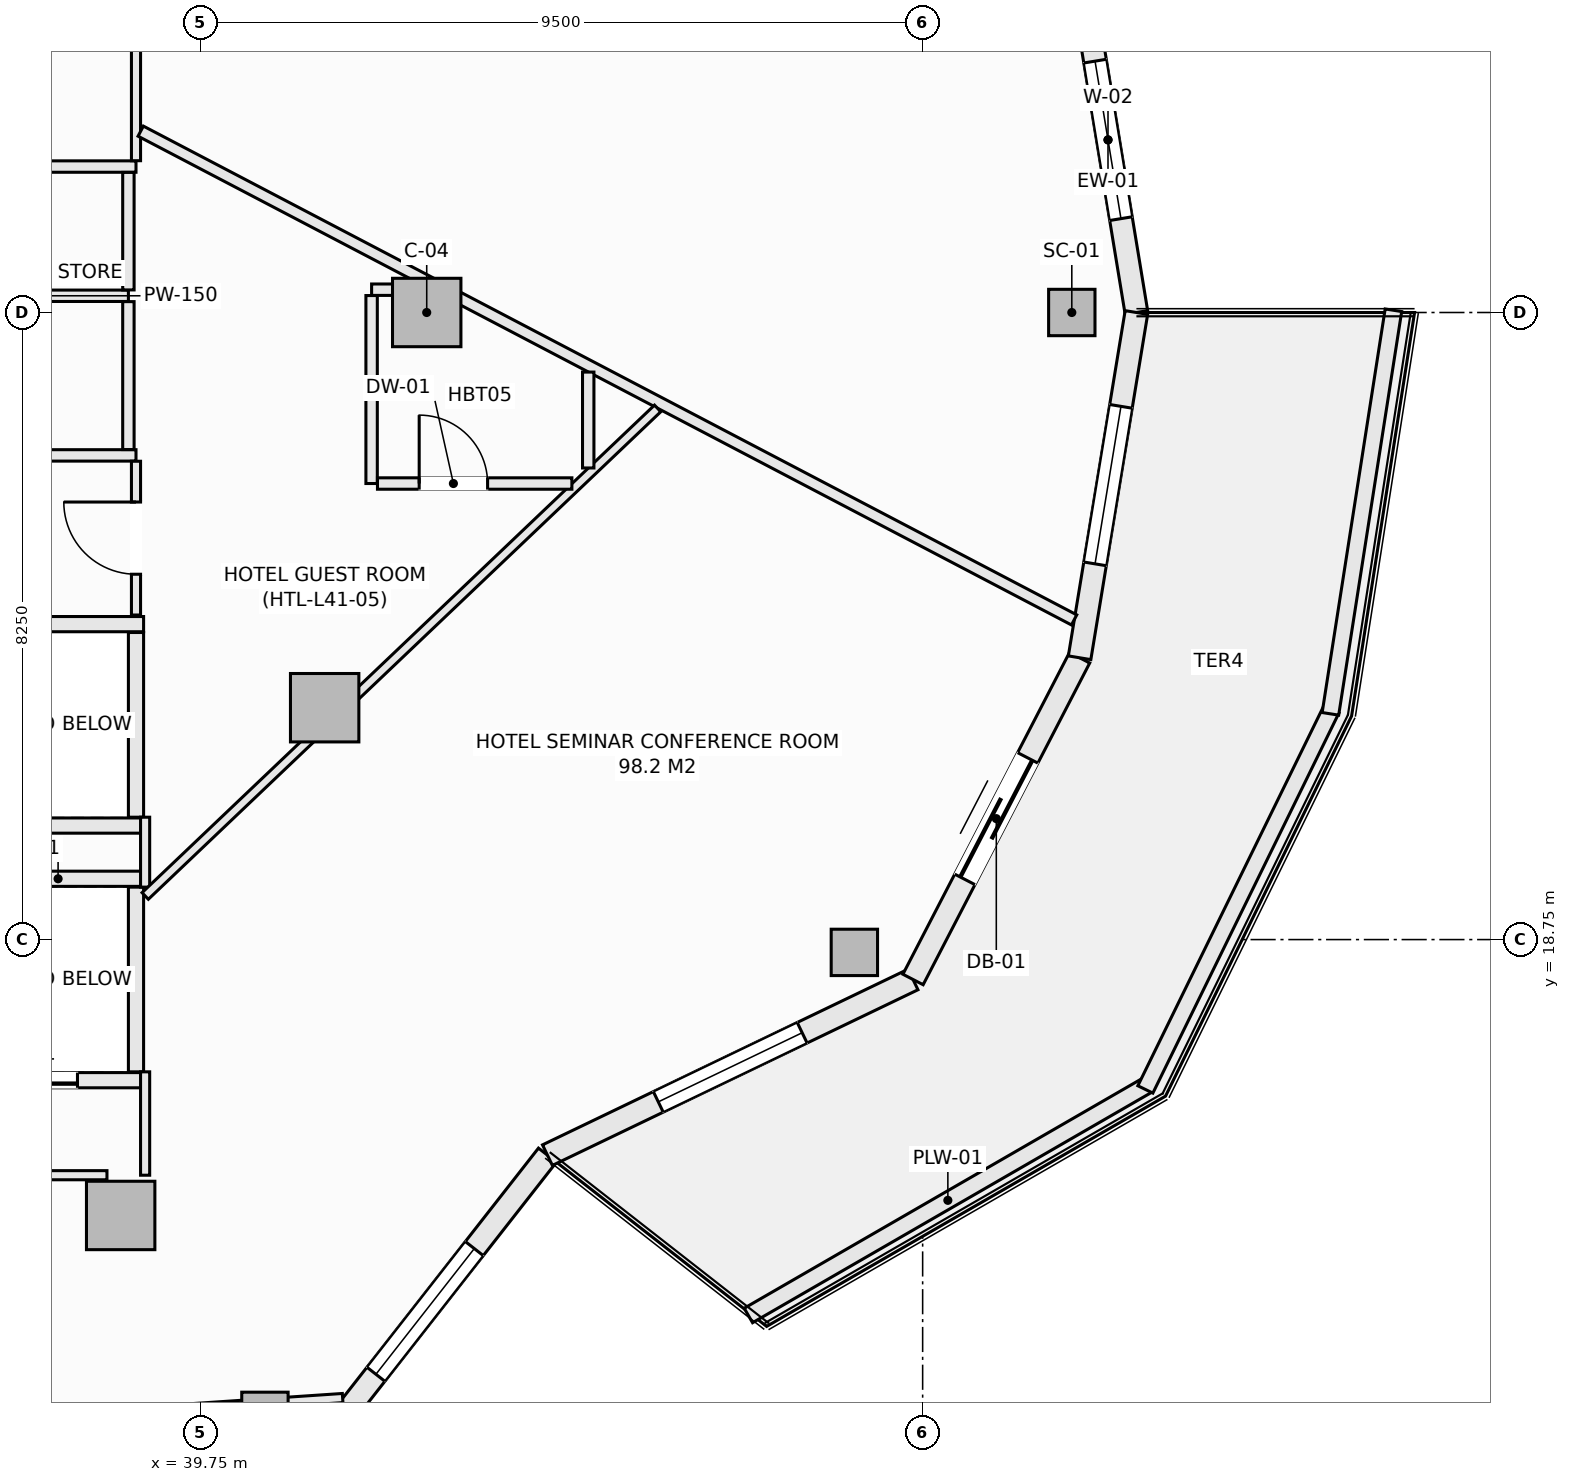
"""IFC4 building model, lengths in metres.
Left out: names, types, materials, properties, quantities, classifications, styles, units other than length and angle.
Written with IfcOpenShell. Run it as: python <this file> out.ifc"""

import sys

from ifc_helpers import new_model, si_unit, direction, frame, frame_2d, origin, origin_2d, place, context, subcontext, project, spatial, rectangle, hollow_rectangle, extrude, element, fill, save


model = new_model("IFC4")
c1 = context("Model", 3, precision=1e-05, world=origin(), true_north=direction((0.0, 1.0)))
c2 = subcontext(c1, "Body", "Model", "MODEL_VIEW")
j1 = project(units=[si_unit("LENGTHUNIT", "METRE"), si_unit("PLANEANGLEUNIT", "RADIAN")], contexts=[c1])
p1 = place(None, origin())
s1 = spatial("IfcSite", under=j1, at=p1, CompositionType="ELEMENT")
p2 = place(p1, origin())
s2 = spatial("IfcBuilding", under=s1, at=p2, CompositionType="ELEMENT")
p3 = place(p2, frame((0.0, 0.0, 159.7)))
s3 = spatial("IfcBuildingStorey", under=s2, at=p3, CompositionType="ELEMENT", Elevation=159.7)
for number, where, z_axis, x_axis in (
    (1, (51.212, 27.0, -0.27), (0.0, 0.0, 1.0), (1.0, 0.0, 0.0)),
    (2, (40.596, 12.49, -0.27), (0.0, 0.0, 1.0), (1.0, 0.0, 0.0)),
    (3, (48.352, 18.581, -0.27), (0.0, 0.0, 1.0), (1.0, 0.0, 0.0)),
):
    element("IfcColumn", number, at=place(p3, frame(where, z_axis=z_axis, x_axis=x_axis)), inside=s3, PredefinedType="COLUMN", context=c2, shape_type="SweptSolid", body=[
        extrude(hollow_rectangle(XDim=0.61, YDim=0.61, WallThickness=0.025, at=origin_2d()), origin(), (0.0, 0.0, 1.0), 3.4),
    ])
for number, where, z_axis, x_axis in (
    (4, (42.725, 27.0, -0.27), (0.0, 0.0, 1.0), (1.0, 0.0, 0.0)),
    (5, (38.698, 15.121, -0.27), (0.0, 0.0, 1.0), (1.0, 0.0, 0.0)),
    (6, (41.382, 21.801, -0.27), (0.0, 0.0, 1.0), (1.0, 0.0, 0.0)),
):
    element("IfcColumn", number, at=place(p3, frame(where, z_axis=z_axis, x_axis=x_axis)), inside=s3, PredefinedType="COLUMN", context=c2, shape_type="SweptSolid", body=[
        extrude(rectangle(XDim=0.9, YDim=0.9, at=origin_2d()), origin(), (0.0, 0.0, 1.0), 3.4),
    ])
p4 = place(p3, frame((51.315, 31.542, 0.0), z_axis=(0.0, 0.0, 1.0), x_axis=(0.162394765401, -0.986725868806, 0.0)))
e7 = element("IfcWall", 7, at=p4, inside=s3, PredefinedType="SOLIDWALL", context=c2, shape_type="SweptSolid", body=[
    extrude(rectangle(XDim=4.603, YDim=0.3, at=frame_2d((2.302, 0.0))), origin(), (0.0, 0.0, 1.0), 2.653),
])
p5 = place(p4, frame((1.252, 0.0, 0.74)))
e8 = element("IfcOpeningElement", 8, at=p5, cuts=e7, PredefinedType="OPENING", context=c2, shape_type="SweptSolid", body=[
    extrude(rectangle(XDim=2.1, YDim=1.7, at=frame_2d((1.05, 0.85))), frame((0.0, 0.16, 0.0), z_axis=(0.0, -1.0, 0.0), x_axis=(1.0, 0.0, 0.0)), (0.0, 0.0, 1.0), 0.32),
])
p6 = place(p3, frame((41.094, 11.801, 0.0), z_axis=(0.0, 0.0, 1.0), x_axis=(0.616429245738, 0.787410302828, 0.0)))
e9 = element("IfcWall", 9, at=p6, inside=s3, PredefinedType="SOLIDWALL", context=c2, shape_type="SweptSolid", body=[
    extrude(rectangle(XDim=5.223, YDim=0.3, at=frame_2d((2.612, 0.0))), origin(), (0.0, 0.0, 1.0), 2.653),
])
p7 = place(p6, frame((1.562, 0.0, 0.74)))
e10 = element("IfcOpeningElement", 10, at=p7, cuts=e9, PredefinedType="OPENING", context=c2, shape_type="SweptSolid", body=[
    extrude(rectangle(XDim=2.1, YDim=1.7, at=frame_2d((1.05, 0.85))), frame((0.0, 0.16, 0.0), z_axis=(0.0, -1.0, 0.0), x_axis=(1.0, 0.0, 0.0)), (0.0, 0.0, 1.0), 0.32),
])
p8 = place(p3, frame((44.313, 15.914, 0.0), z_axis=(0.0, 0.0, 1.0), x_axis=(0.901353070301, 0.433085029363, 0.0)))
e11 = element("IfcWall", 11, at=p8, inside=s3, PredefinedType="SOLIDWALL", context=c2, shape_type="SweptSolid", body=[
    extrude(rectangle(XDim=5.336, YDim=0.3, at=frame_2d((2.668, 0.0))), origin(), (0.0, 0.0, 1.0), 2.653),
])
p9 = place(p8, frame((1.618, 0.0, 0.74)))
e12 = element("IfcOpeningElement", 12, at=p9, cuts=e11, PredefinedType="OPENING", context=c2, shape_type="SweptSolid", body=[
    extrude(rectangle(XDim=2.1, YDim=1.7, at=frame_2d((1.05, 0.85))), frame((0.0, 0.16, 0.0), z_axis=(0.0, -1.0, 0.0), x_axis=(1.0, 0.0, 0.0)), (0.0, 0.0, 1.0), 0.32),
])
p10 = place(p3, frame((49.123, 18.225, 0.0), z_axis=(0.0, 0.0, 1.0), x_axis=(0.459810251451, 0.888017191647, 0.0)))
e13 = element("IfcWall", 13, at=p10, inside=s3, PredefinedType="SOLIDWALL", context=c2, shape_type="SweptSolid", body=[
    extrude(rectangle(XDim=4.766, YDim=0.3, at=frame_2d((2.383, 0.0))), origin(), (0.0, 0.0, 1.0), 2.653),
])
p11 = place(p10, frame((1.483, 0.0, 0.0)))
e14 = element("IfcOpeningElement", 14, at=p11, cuts=e13, PredefinedType="OPENING", context=c2, shape_type="SweptSolid", body=[
    extrude(rectangle(XDim=1.8, YDim=2.25, at=frame_2d((0.9, 1.125))), frame((0.0, 0.16, 0.0), z_axis=(0.0, -1.0, 0.0), x_axis=(1.0, 0.0, 0.0)), (0.0, 0.0, 1.0), 0.32),
])
p12 = place(p3, frame((51.315, 22.458, 0.0), z_axis=(0.0, 0.0, 1.0), x_axis=(0.162394765401, 0.986725868806, 0.0)))
e15 = element("IfcWall", 15, at=p12, inside=s3, PredefinedType="SOLIDWALL", context=c2, shape_type="SweptSolid", body=[
    extrude(rectangle(XDim=4.603, YDim=0.3, at=frame_2d((2.302, 0.0))), origin(), (0.0, 0.0, 1.0), 2.653),
])
p13 = place(p12, frame((1.252, 0.0, 0.74)))
e16 = element("IfcOpeningElement", 16, at=p13, cuts=e15, PredefinedType="OPENING", context=c2, shape_type="SweptSolid", body=[
    extrude(rectangle(XDim=2.1, YDim=1.7, at=frame_2d((1.05, 0.85))), frame((0.0, 0.16, 0.0), z_axis=(0.0, -1.0, 0.0), x_axis=(1.0, 0.0, 0.0)), (0.0, 0.0, 1.0), 0.32),
])
p14 = place(p3, frame((46.958, 13.805, 0.0), z_axis=(0.0, 0.0, 1.0), x_axis=(0.866058128659, 0.499943314571, 0.0)))
e17 = element("IfcWall", 17, at=p14, inside=s3, PredefinedType="PARAPET", context=c2, shape_type="SweptSolid", body=[
    extrude(rectangle(XDim=6.06, YDim=0.22, at=frame_2d((3.03, 0.0))), origin(), (0.0, 0.0, 1.0), 0.52),
])
p15 = place(p3, frame((52.18, 16.779, 0.0), z_axis=(0.0, 0.0, 1.0), x_axis=(0.439637174641, 0.898175458735, 0.0)))
e18 = element("IfcWall", 18, at=p15, inside=s3, PredefinedType="PARAPET", context=c2, shape_type="SweptSolid", body=[
    extrude(rectangle(XDim=5.567, YDim=0.22, at=frame_2d((2.784, 0.0))), origin(), (0.0, 0.0, 1.0), 0.52),
])
p16 = place(p3, frame((54.615, 21.72, 0.0), z_axis=(0.0, 0.0, 1.0), x_axis=(0.154245214003, 0.988032597619, 0.0)))
e19 = element("IfcWall", 19, at=p16, inside=s3, PredefinedType="PARAPET", context=c2, shape_type="SweptSolid", body=[
    extrude(rectangle(XDim=5.374, YDim=0.22, at=frame_2d((2.687, 0.0))), origin(), (0.0, 0.0, 1.0), 0.52),
])
p17 = place(p3, frame((36.75, 19.55, 0.0), z_axis=(0.0, 0.0, 1.0), x_axis=(1.0, 0.0, 0.0)))
e20 = element("IfcWall", 20, at=p17, inside=s3, PredefinedType="SOLIDWALL", context=c2, shape_type="SweptSolid", body=[
    extrude(rectangle(XDim=2.25, YDim=0.2, at=frame_2d((1.125, 0.0))), origin(), (0.0, 0.0, 1.0), 3.13),
])
p18 = place(p3, frame((36.75, 16.9, 0.0), z_axis=(0.0, 0.0, 1.0), x_axis=(1.0, 0.0, 0.0)))
e21 = element("IfcWall", 21, at=p18, inside=s3, PredefinedType="SOLIDWALL", context=c2, shape_type="SweptSolid", body=[
    extrude(rectangle(XDim=2.25, YDim=0.2, at=frame_2d((1.125, 0.0))), origin(), (0.0, 0.0, 1.0), 3.13),
])
p19 = place(p18, frame((0.28, 0.0, 0.0)))
e22 = element("IfcOpeningElement", 22, at=p19, cuts=e21, PredefinedType="OPENING", context=c2, shape_type="SweptSolid", body=[
    extrude(rectangle(XDim=1.1, YDim=2.2, at=frame_2d((0.55, 1.1))), frame((0.0, 0.11, 0.0), z_axis=(0.0, -1.0, 0.0), x_axis=(1.0, 0.0, 0.0)), (0.0, 0.0, 1.0), 0.22),
])
p20 = place(p3, frame((38.9, 17.01, 0.0), z_axis=(0.0, 0.0, 1.0), x_axis=(0.0, 1.0, 0.0)))
e23 = element("IfcWall", 23, at=p20, inside=s3, PredefinedType="SOLIDWALL", context=c2, shape_type="SweptSolid", body=[
    extrude(rectangle(XDim=2.43, YDim=0.2, at=frame_2d((1.215, 0.0))), origin(), (0.0, 0.0, 1.0), 3.13),
])
for number, where, z_axis, x_axis in (
    (24, (36.75, 22.9, 0.0), (0.0, 0.0, 1.0), (1.0, 0.0, 0.0)),
    (25, (36.75, 20.25, 0.0), (0.0, 0.0, 1.0), (1.0, 0.0, 0.0)),
):
    element("IfcWall", number, at=place(p3, frame(where, z_axis=z_axis, x_axis=x_axis)), inside=s3, PredefinedType="SOLIDWALL", context=c2, shape_type="SweptSolid", body=[
        extrude(rectangle(XDim=2.25, YDim=0.2, at=frame_2d((1.125, 0.0))), origin(), (0.0, 0.0, 1.0), 3.13),
    ])
p21 = place(p3, frame((38.9, 20.36, 0.0), z_axis=(0.0, 0.0, 1.0), x_axis=(0.0, 1.0, 0.0)))
e26 = element("IfcWall", 26, at=p21, inside=s3, PredefinedType="SOLIDWALL", context=c2, shape_type="SweptSolid", body=[
    extrude(rectangle(XDim=2.43, YDim=0.2, at=frame_2d((1.215, 0.0))), origin(), (0.0, 0.0, 1.0), 3.13),
])
p22 = place(p3, frame((30.077, 28.92, 0.0), z_axis=(0.0, 0.0, 1.0), x_axis=(1.0, 0.0, 0.0)))
e27 = element("IfcWall", 27, at=p22, inside=s3, PredefinedType="PARTITIONING", context=c2, shape_type="SweptSolid", body=[
    extrude(rectangle(XDim=8.823, YDim=0.15, at=frame_2d((4.412, 0.0))), origin(), (0.0, 0.0, 1.0), 3.13),
])
p23 = place(p22, frame((1.342, 0.0, 0.0)))
e28 = element("IfcOpeningElement", 28, at=p23, cuts=e27, PredefinedType="OPENING", context=c2, shape_type="SweptSolid", body=[
    extrude(rectangle(XDim=0.95, YDim=2.1, at=frame_2d((0.475, 1.05))), frame((0.0, 0.085, 0.0), z_axis=(0.0, -1.0, 0.0), x_axis=(1.0, 0.0, 0.0)), (0.0, 0.0, 1.0), 0.17),
])
p24 = place(p22, frame((5.343, 0.0, 0.0)))
e29 = element("IfcOpeningElement", 29, at=p24, cuts=e27, PredefinedType="OPENING", context=c2, shape_type="SweptSolid", body=[
    extrude(rectangle(XDim=0.95, YDim=2.1, at=frame_2d((0.475, 1.05))), frame((0.0, 0.085, 0.0), z_axis=(0.0, -1.0, 0.0), x_axis=(1.0, 0.0, 0.0)), (0.0, 0.0, 1.0), 0.17),
])
p25 = place(p3, frame((33.377, 25.12, 0.0), z_axis=(0.0, 0.0, 1.0), x_axis=(1.0, 0.0, 0.0)))
e30 = element("IfcWall", 30, at=p25, inside=s3, PredefinedType="PARTITIONING", context=c2, shape_type="SweptSolid", body=[
    extrude(rectangle(XDim=5.523, YDim=0.15, at=frame_2d((2.761, 0.0))), origin(), (0.0, 0.0, 1.0), 3.13),
])
p26 = place(p25, frame((2.287, 0.0, 0.0)))
e31 = element("IfcOpeningElement", 31, at=p26, cuts=e30, PredefinedType="OPENING", context=c2, shape_type="SweptSolid", body=[
    extrude(rectangle(XDim=0.95, YDim=2.1, at=frame_2d((0.475, 1.05))), frame((0.0, 0.085, 0.0), z_axis=(0.0, -1.0, 0.0), x_axis=(1.0, 0.0, 0.0)), (0.0, 0.0, 1.0), 0.17),
])
p27 = place(p3, frame((33.377, 27.22, 0.0), z_axis=(0.0, 0.0, 1.0), x_axis=(1.0, 0.0, 0.0)))
e32 = element("IfcWall", 32, at=p27, inside=s3, PredefinedType="PARTITIONING", context=c2, shape_type="SweptSolid", body=[
    extrude(rectangle(XDim=5.423, YDim=0.15, at=frame_2d((2.711, 0.0))), origin(), (0.0, 0.0, 1.0), 3.13),
])
p28 = place(p3, frame((38.8, 25.197, 0.0), z_axis=(0.0, 0.0, 1.0), x_axis=(0.0, 1.0, 0.0)))
e33 = element("IfcWall", 33, at=p28, inside=s3, PredefinedType="PARTITIONING", context=c2, shape_type="SweptSolid", body=[
    extrude(rectangle(XDim=1.946, YDim=0.15, at=frame_2d((0.973, 0.0))), origin(), (0.0, 0.0, 1.0), 3.13),
])
p29 = place(p3, frame((38.8, 27.297, 0.0), z_axis=(0.0, 0.0, 1.0), x_axis=(0.0, 1.0, 0.0)))
e34 = element("IfcWall", 34, at=p29, inside=s3, PredefinedType="PARTITIONING", context=c2, shape_type="SweptSolid", body=[
    extrude(rectangle(XDim=1.546, YDim=0.15, at=frame_2d((0.773, 0.0))), origin(), (0.0, 0.0, 1.0), 3.13),
])
p30 = place(p3, frame((39.02, 15.65, 0.0), z_axis=(0.0, 0.0, 1.0), x_axis=(0.0, 1.0, 0.0)))
e35 = element("IfcWall", 35, at=p30, inside=s3, PredefinedType="PARTITIONING", context=c2, shape_type="SweptSolid", body=[
    extrude(rectangle(XDim=1.36, YDim=0.12, at=frame_2d((0.68, 0.0))), origin(), (0.0, 0.0, 1.0), 2.505),
])
p31 = place(p3, frame((39.02, 19.44, 0.0), z_axis=(0.0, 0.0, 1.0), x_axis=(0.0, 1.0, 0.0)))
e36 = element("IfcWall", 36, at=p31, inside=s3, PredefinedType="PARTITIONING", context=c2, shape_type="SweptSolid", body=[
    extrude(rectangle(XDim=0.92, YDim=0.12, at=frame_2d((0.46, 0.0))), origin(), (0.0, 0.0, 1.0), 3.13),
])
p32 = place(p3, frame((35.95, 15.65, 0.0), z_axis=(0.0, 0.0, 1.0), x_axis=(1.0, 0.0, 0.0)))
e37 = element("IfcWall", 37, at=p32, inside=s3, PredefinedType="PARTITIONING", context=c2, shape_type="SweptSolid", body=[
    extrude(rectangle(XDim=2.568, YDim=0.12, at=frame_2d((1.284, 0.0))), origin(), (0.0, 0.0, 1.0), 3.13),
])
p33 = place(p3, frame((38.9, 23.02, 0.0), z_axis=(0.0, 0.0, 1.0), x_axis=(0.0, 1.0, 0.0)))
e38 = element("IfcWall", 38, at=p33, inside=s3, PredefinedType="PARTITIONING", context=c2, shape_type="SweptSolid", body=[
    extrude(rectangle(XDim=2.023, YDim=0.12, at=frame_2d((1.011, 0.0))), origin(), (0.0, 0.0, 1.0), 3.13),
])
p34 = place(p33, frame((0.537, 0.0, 0.0)))
e39 = element("IfcOpeningElement", 39, at=p34, cuts=e38, PredefinedType="OPENING", context=c2, shape_type="SweptSolid", body=[
    extrude(rectangle(XDim=0.95, YDim=2.1, at=frame_2d((0.475, 1.05))), frame((0.0, 0.07, 0.0), z_axis=(0.0, -1.0, 0.0), x_axis=(1.0, 0.0, 0.0)), (0.0, 0.0, 1.0), 0.14),
])
p35 = place(p3, frame((38.9, 28.997, 0.0), z_axis=(0.0, 0.0, 1.0), x_axis=(0.0, 1.0, 0.0)))
e40 = element("IfcWall", 40, at=p35, inside=s3, PredefinedType="PARTITIONING", context=c2, shape_type="SweptSolid", body=[
    extrude(rectangle(XDim=2.123, YDim=0.12, at=frame_2d((1.062, 0.0))), origin(), (0.0, 0.0, 1.0), 3.13),
])
p36 = place(p3, frame((38.962, 29.386, 0.0), z_axis=(0.0, 0.0, 1.0), x_axis=(0.885905291329, -0.463866160434, 0.0)))
e41 = element("IfcWall", 41, at=p36, inside=s3, PredefinedType="PARTITIONING", context=c2, shape_type="SweptSolid", body=[
    extrude(rectangle(XDim=13.863, YDim=0.15, at=frame_2d((6.931, 0.0))), origin(), (0.0, 0.0, 1.0), 2.505),
])
p37 = place(p3, frame((39.021, 19.324, 0.0), z_axis=(0.0, 0.0, 1.0), x_axis=(0.724517158733, 0.689256763986, 0.0)))
e42 = element("IfcWall", 42, at=p37, inside=s3, PredefinedType="PARTITIONING", context=c2, shape_type="SweptSolid", body=[
    extrude(rectangle(XDim=9.306, YDim=0.12, at=frame_2d((4.653, 0.0))), origin(), (0.0, 0.0, 1.0), 2.505),
])
p38 = place(p3, frame((36.012, 12.34, 0.0), z_axis=(0.0, 0.0, 1.0), x_axis=(0.997733146572, 0.067294637466, 0.0)))
e43 = element("IfcWall", 43, at=p38, inside=s3, PredefinedType="PARTITIONING", context=c2, shape_type="SweptSolid", body=[
    extrude(rectangle(XDim=5.62, YDim=0.12, at=frame_2d((2.81, 0.0))), origin(), (0.0, 0.0, 1.0), 2.653),
])
p39 = place(p3, frame((42.0, 27.3, 0.0), z_axis=(0.0, 0.0, 1.0), x_axis=(1.0, 0.0, 0.0)))
e44 = element("IfcWall", 44, at=p39, inside=s3, PredefinedType="PARTITIONING", context=c2, shape_type="SweptSolid", body=[
    extrude(rectangle(XDim=0.78, YDim=0.15, at=frame_2d((0.39, 0.0))), origin(), (0.0, 0.0, 1.0), 3.13),
])
p40 = place(p3, frame((42.0, 24.75, 0.0), z_axis=(0.0, 0.0, 1.0), x_axis=(0.0, 1.0, 0.0)))
e45 = element("IfcWall", 45, at=p40, inside=s3, PredefinedType="PARTITIONING", context=c2, shape_type="SweptSolid", body=[
    extrude(rectangle(XDim=2.473, YDim=0.15, at=frame_2d((1.236, 0.0))), origin(), (0.0, 0.0, 1.0), 2.505),
])
p41 = place(p3, frame((42.077, 24.75, 0.0), z_axis=(0.0, 0.0, 1.0), x_axis=(1.0, 0.0, 0.0)))
e46 = element("IfcWall", 46, at=p41, inside=s3, PredefinedType="PARTITIONING", context=c2, shape_type="SweptSolid", body=[
    extrude(rectangle(XDim=2.558, YDim=0.15, at=frame_2d((1.279, 0.0))), origin(), (0.0, 0.0, 1.0), 3.13),
])
p42 = place(p41, frame((0.549, 0.0, 0.0)))
e47 = element("IfcOpeningElement", 47, at=p42, cuts=e46, PredefinedType="OPENING", context=c2, shape_type="SweptSolid", body=[
    extrude(rectangle(XDim=0.9, YDim=2.1, at=frame_2d((0.45, 1.05))), frame((0.0, 0.085, 0.0), z_axis=(0.0, -1.0, 0.0), x_axis=(1.0, 0.0, 0.0)), (0.0, 0.0, 1.0), 0.17),
])
p43 = place(p3, frame((44.85, 24.955, 0.0), z_axis=(0.0, 0.0, 1.0), x_axis=(0.0, 1.0, 0.0)))
e48 = element("IfcWall", 48, at=p43, inside=s3, PredefinedType="PARTITIONING", context=c2, shape_type="SweptSolid", body=[
    extrude(rectangle(XDim=1.261, YDim=0.15, at=frame_2d((0.631, 0.0))), origin(), (0.0, 0.0, 1.0), 3.13),
])
p44 = place(p5, origin())
e49 = element("IfcWindow", 49, at=p44, inside=s3, PartitioningType="SINGLE_PANEL", PredefinedType="WINDOW", context=c2, shape_type="SweptSolid", body=[
    extrude(rectangle(XDim=2.1, YDim=1.7, at=frame_2d((1.05, 0.85))), frame((0.0, 0.03, 0.0), z_axis=(0.0, -1.0, 0.0), x_axis=(1.0, 0.0, 0.0)), (0.0, 0.0, 1.0), 0.06),
])
fill(e8, e49)
p45 = place(p7, origin())
e50 = element("IfcWindow", 50, at=p45, inside=s3, PartitioningType="SINGLE_PANEL", PredefinedType="WINDOW", context=c2, shape_type="SweptSolid", body=[
    extrude(rectangle(XDim=2.1, YDim=1.7, at=frame_2d((1.05, 0.85))), frame((0.0, 0.03, 0.0), z_axis=(0.0, -1.0, 0.0), x_axis=(1.0, 0.0, 0.0)), (0.0, 0.0, 1.0), 0.06),
])
fill(e10, e50)
p46 = place(p9, origin())
e51 = element("IfcWindow", 51, at=p46, inside=s3, PartitioningType="SINGLE_PANEL", PredefinedType="WINDOW", context=c2, shape_type="SweptSolid", body=[
    extrude(rectangle(XDim=2.1, YDim=1.7, at=frame_2d((1.05, 0.85))), frame((0.0, 0.03, 0.0), z_axis=(0.0, -1.0, 0.0), x_axis=(1.0, 0.0, 0.0)), (0.0, 0.0, 1.0), 0.06),
])
fill(e12, e51)
p47 = place(p11, frame((1.8, 0.0, 0.0), z_axis=(0.0, 0.0, 1.0), x_axis=(-1.0, 0.0, 0.0)))
e52 = element("IfcDoor", 52, at=p47, inside=s3, OperationType="SLIDING_TO_LEFT", PredefinedType="DOOR", context=c2, shape_type="SweptSolid", body=[
    extrude(rectangle(XDim=1.8, YDim=2.25, at=frame_2d((0.9, 1.125))), frame((0.0, 0.025, 0.0), z_axis=(0.0, -1.0, 0.0), x_axis=(1.0, 0.0, 0.0)), (0.0, 0.0, 1.0), 0.05),
])
fill(e14, e52)
p48 = place(p13, origin())
e53 = element("IfcWindow", 53, at=p48, inside=s3, PartitioningType="SINGLE_PANEL", PredefinedType="WINDOW", context=c2, shape_type="SweptSolid", body=[
    extrude(rectangle(XDim=2.1, YDim=1.7, at=frame_2d((1.05, 0.85))), frame((0.0, 0.03, 0.0), z_axis=(0.0, -1.0, 0.0), x_axis=(1.0, 0.0, 0.0)), (0.0, 0.0, 1.0), 0.06),
])
fill(e16, e53)
p49 = place(p19, origin())
e54 = element("IfcDoor", 54, at=p49, inside=s3, OperationType="SLIDING_TO_LEFT", PredefinedType="DOOR", context=c2, shape_type="SweptSolid", body=[
    extrude(rectangle(XDim=1.1, YDim=2.2, at=frame_2d((0.55, 1.1))), frame((0.0, 0.025, 0.0), z_axis=(0.0, -1.0, 0.0), x_axis=(1.0, 0.0, 0.0)), (0.0, 0.0, 1.0), 0.05),
])
fill(e22, e54)
p50 = place(p34, origin())
e55 = element("IfcDoor", 55, at=p50, inside=s3, OperationType="SINGLE_SWING_RIGHT", PredefinedType="DOOR", context=c2, shape_type="SweptSolid", body=[
    extrude(rectangle(XDim=0.95, YDim=2.1, at=frame_2d((0.475, 1.05))), frame((0.0, 0.025, 0.0), z_axis=(0.0, -1.0, 0.0), x_axis=(1.0, 0.0, 0.0)), (0.0, 0.0, 1.0), 0.05),
])
fill(e39, e55)
p51 = place(p42, origin())
e56 = element("IfcDoor", 56, at=p51, inside=s3, OperationType="SINGLE_SWING_LEFT", PredefinedType="DOOR", context=c2, shape_type="SweptSolid", body=[
    extrude(rectangle(XDim=0.9, YDim=2.1, at=frame_2d((0.45, 1.05))), frame((0.0, 0.025, 0.0), z_axis=(0.0, -1.0, 0.0), x_axis=(1.0, 0.0, 0.0)), (0.0, 0.0, 1.0), 0.05),
])
fill(e47, e56)
save(model, sys.argv[1])
